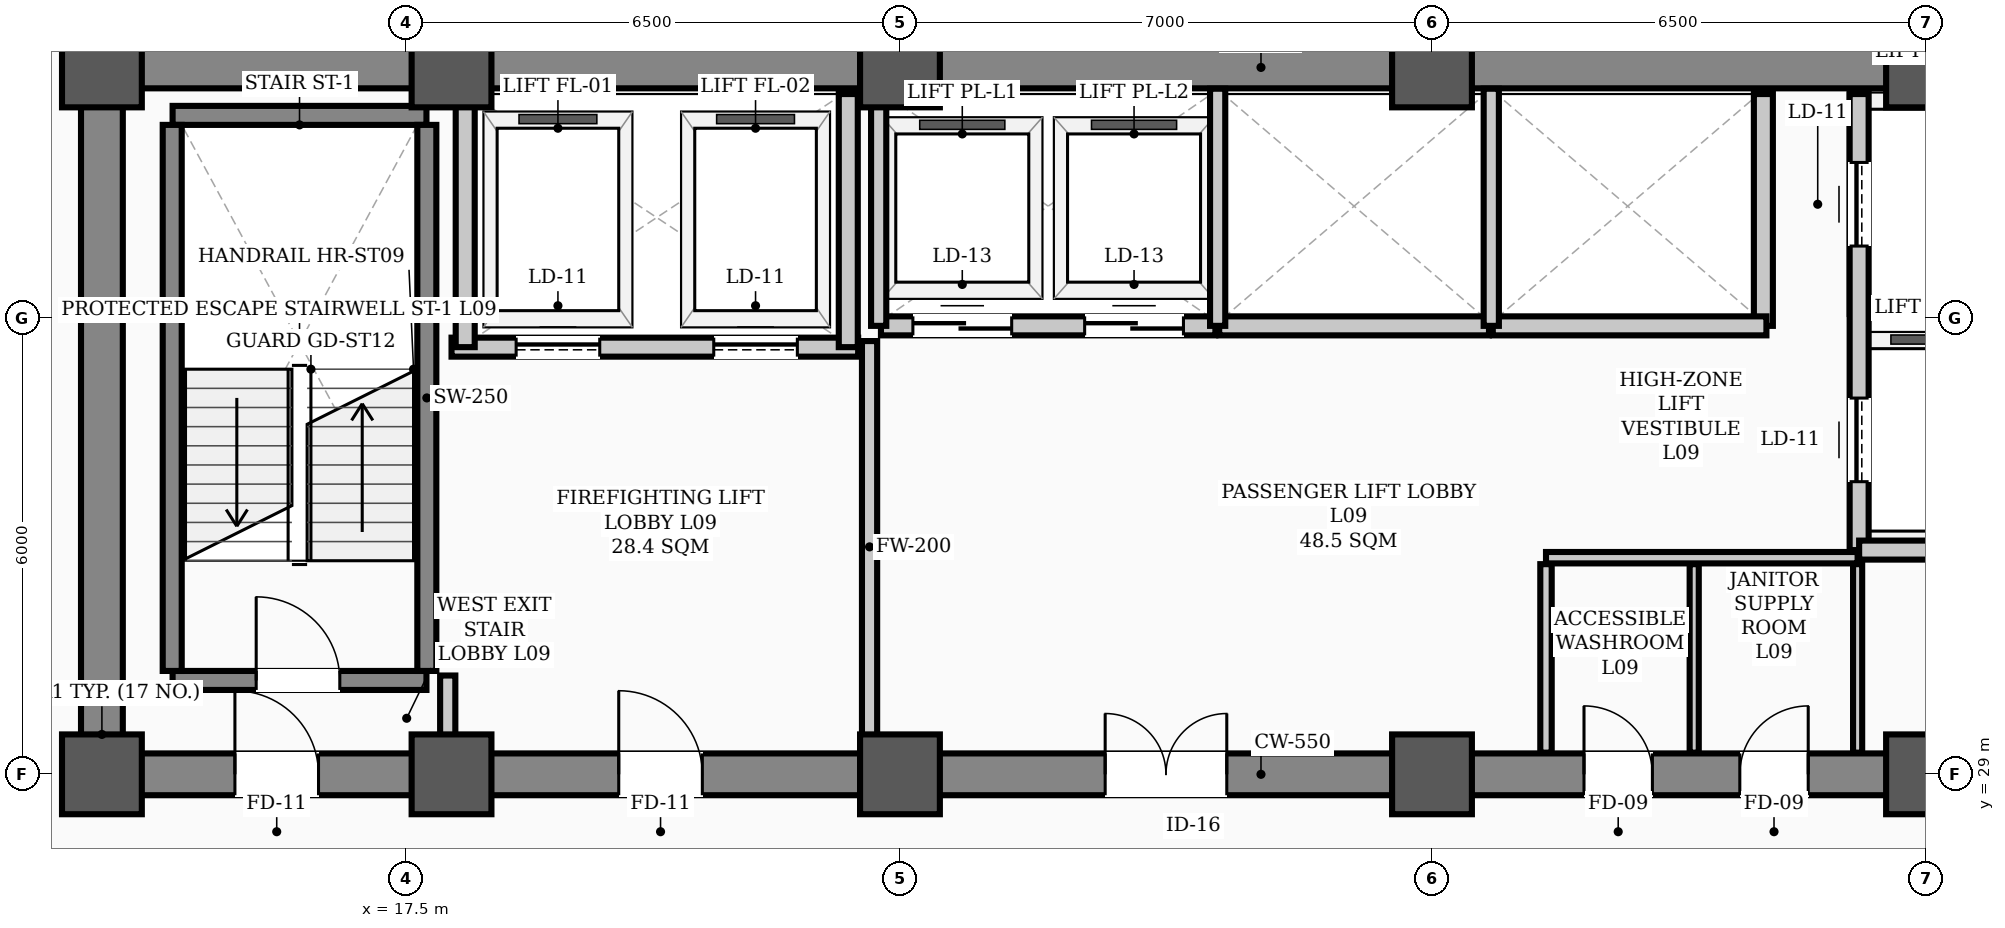
"""IFC4 building model, lengths in metres.
Left out: names, types, materials, properties, quantities, classifications, styles, units other than length and angle.
Written with IfcOpenShell. Run it as: python <this file> out.ifc"""

import sys

from ifc_helpers import new_model, si_unit, direction, frame, frame_2d, origin, origin_2d, place, context, subcontext, project, spatial, rectangle, hollow_rectangle, extrude, element, fill, save


model = new_model("IFC4")
c1 = context("Model", 3, precision=1e-05, world=origin(), true_north=direction((0.0, 1.0)))
c2 = subcontext(c1, "Body", "Model", "MODEL_VIEW")
j1 = project(units=[si_unit("LENGTHUNIT", "METRE"), si_unit("PLANEANGLEUNIT", "RADIAN")], contexts=[c1])
p1 = place(None, origin())
s1 = spatial("IfcSite", under=j1, at=p1, CompositionType="ELEMENT")
p2 = place(p1, origin())
s2 = spatial("IfcBuilding", under=s1, at=p2, CompositionType="ELEMENT")
p3 = place(p2, frame((0.0, 0.0, 38.2)))
s3 = spatial("IfcBuildingStorey", under=s2, at=p3, CompositionType="ELEMENT", Elevation=38.2)
for number, where, z_axis, x_axis in (
    (1, (13.5, 29.0, 0.0), (0.0, 0.0, 1.0), (1.0, 0.0, 0.0)),
    (2, (13.5, 38.3, 0.0), (0.0, 0.0, 1.0), (1.0, 0.0, 0.0)),
    (3, (18.1, 29.0, 0.0), (0.0, 0.0, 1.0), (1.0, 0.0, 0.0)),
    (4, (18.1, 38.3, 0.0), (0.0, 0.0, 1.0), (1.0, 0.0, 0.0)),
    (5, (24.0, 29.0, 0.0), (0.0, 0.0, 1.0), (1.0, 0.0, 0.0)),
    (6, (24.0, 38.3, 0.0), (0.0, 0.0, 1.0), (1.0, 0.0, 0.0)),
    (7, (31.0, 29.0, 0.0), (0.0, 0.0, 1.0), (1.0, 0.0, 0.0)),
    (8, (31.0, 38.3, 0.0), (0.0, 0.0, 1.0), (1.0, 0.0, 0.0)),
    (9, (37.5, 29.0, 0.0), (0.0, 0.0, 1.0), (1.0, 0.0, 0.0)),
    (10, (37.5, 38.3, 0.0), (0.0, 0.0, 1.0), (1.0, 0.0, 0.0)),
):
    element("IfcColumn", number, at=place(p3, frame(where, z_axis=z_axis, x_axis=x_axis)), inside=s3, PredefinedType="COLUMN", context=c2, shape_type="SweptSolid", body=[
        extrude(hollow_rectangle(XDim=1.05, YDim=1.05, WallThickness=0.038, InnerFilletRadius=0.019, OuterFilletRadius=0.057, at=origin_2d()), origin(), (0.0, 0.0, 1.0), 3.9),
    ])
p4 = place(p3, frame((13.5, 29.0, 0.0), z_axis=(0.0, 0.0, 1.0), x_axis=(1.0, 0.0, 0.0)))
e11 = element("IfcWall", 11, at=p4, inside=s3, PredefinedType="SHEAR", context=c2, shape_type="SweptSolid", body=[
    extrude(rectangle(XDim=30.5, YDim=0.55, at=frame_2d((15.25, 0.0))), origin(), (0.0, 0.0, 1.0), 3.72),
])
p5 = place(p4, frame((1.75, 0.0, 0.0)))
e12 = element("IfcOpeningElement", 12, at=p5, cuts=e11, PredefinedType="OPENING", context=c2, shape_type="SweptSolid", body=[
    extrude(rectangle(XDim=1.1, YDim=2.08, at=frame_2d((0.55, 1.04))), frame((0.0, 0.285, 0.0), z_axis=(0.0, -1.0, 0.0), x_axis=(1.0, 0.0, 0.0)), (0.0, 0.0, 1.0), 0.57),
])
p6 = place(p4, frame((26.7, 0.0, 0.0)))
e13 = element("IfcOpeningElement", 13, at=p6, cuts=e11, PredefinedType="OPENING", context=c2, shape_type="SweptSolid", body=[
    extrude(rectangle(XDim=1.1, YDim=2.08, at=frame_2d((0.55, 1.04))), frame((0.0, 0.285, 0.0), z_axis=(0.0, -1.0, 0.0), x_axis=(1.0, 0.0, 0.0)), (0.0, 0.0, 1.0), 0.57),
])
p7 = place(p4, frame((6.8, 0.0, 0.0)))
e14 = element("IfcOpeningElement", 14, at=p7, cuts=e11, PredefinedType="OPENING", context=c2, shape_type="SweptSolid", body=[
    extrude(rectangle(XDim=1.1, YDim=2.08, at=frame_2d((0.55, 1.04))), frame((0.0, 0.285, 0.0), z_axis=(0.0, -1.0, 0.0), x_axis=(1.0, 0.0, 0.0)), (0.0, 0.0, 1.0), 0.57),
])
p8 = place(p4, frame((13.2, 0.0, 0.0)))
e15 = element("IfcOpeningElement", 15, at=p8, cuts=e11, PredefinedType="OPENING", context=c2, shape_type="SweptSolid", body=[
    extrude(rectangle(XDim=1.6, YDim=2.08, at=frame_2d((0.8, 1.04))), frame((0.0, 0.285, 0.0), z_axis=(0.0, -1.0, 0.0), x_axis=(1.0, 0.0, 0.0)), (0.0, 0.0, 1.0), 0.57),
])
p9 = place(p4, frame((19.5, 0.0, 0.0)))
e16 = element("IfcOpeningElement", 16, at=p9, cuts=e11, PredefinedType="OPENING", context=c2, shape_type="SweptSolid", body=[
    extrude(rectangle(XDim=0.9, YDim=2.08, at=frame_2d((0.45, 1.04))), frame((0.0, 0.285, 0.0), z_axis=(0.0, -1.0, 0.0), x_axis=(1.0, 0.0, 0.0)), (0.0, 0.0, 1.0), 0.57),
])
p10 = place(p4, frame((21.55, 0.0, 0.0)))
e17 = element("IfcOpeningElement", 17, at=p10, cuts=e11, PredefinedType="OPENING", context=c2, shape_type="SweptSolid", body=[
    extrude(rectangle(XDim=0.9, YDim=2.08, at=frame_2d((0.45, 1.04))), frame((0.0, 0.285, 0.0), z_axis=(0.0, -1.0, 0.0), x_axis=(1.0, 0.0, 0.0)), (0.0, 0.0, 1.0), 0.57),
])
p11 = place(p3, frame((13.5, 38.3, 0.0), z_axis=(0.0, 0.0, 1.0), x_axis=(1.0, 0.0, 0.0)))
e18 = element("IfcWall", 18, at=p11, inside=s3, PredefinedType="SHEAR", context=c2, shape_type="SweptSolid", body=[
    extrude(rectangle(XDim=30.5, YDim=0.55, at=frame_2d((15.25, 0.0))), origin(), (0.0, 0.0, 1.0), 3.72),
])
p12 = place(p3, frame((13.5, 29.35, 0.0), z_axis=(0.0, 0.0, 1.0), x_axis=(0.0, 1.0, 0.0)))
e19 = element("IfcWall", 19, at=p12, inside=s3, PredefinedType="SHEAR", context=c2, shape_type="SweptSolid", body=[
    extrude(rectangle(XDim=8.6, YDim=0.55, at=frame_2d((4.3, 0.0))), origin(), (0.0, 0.0, 1.0), 3.72),
])
p13 = place(p3, frame((14.43, 30.235, 0.0), z_axis=(0.0, 0.0, 1.0), x_axis=(1.0, 0.0, 0.0)))
e20 = element("IfcWall", 20, at=p13, inside=s3, PredefinedType="STANDARD", context=c2, shape_type="SweptSolid", body=[
    extrude(rectangle(XDim=3.34, YDim=0.25, at=frame_2d((1.67, 0.0))), origin(), (0.0, 0.0, 1.0), 3.72),
])
p14 = place(p13, frame((1.1, 0.0, 0.0)))
e21 = element("IfcOpeningElement", 21, at=p14, cuts=e20, PredefinedType="OPENING", context=c2, shape_type="SweptSolid", body=[
    extrude(rectangle(XDim=1.1, YDim=2.08, at=frame_2d((0.55, 1.04))), frame((0.0, 0.135, 0.0), z_axis=(0.0, -1.0, 0.0), x_axis=(1.0, 0.0, 0.0)), (0.0, 0.0, 1.0), 0.27),
])
p15 = place(p3, frame((14.43, 37.669, 0.0), z_axis=(0.0, 0.0, 1.0), x_axis=(1.0, 0.0, 0.0)))
e22 = element("IfcWall", 22, at=p15, inside=s3, PredefinedType="STANDARD", context=c2, shape_type="SweptSolid", body=[
    extrude(rectangle(XDim=3.34, YDim=0.25, at=frame_2d((1.67, 0.0))), origin(), (0.0, 0.0, 1.0), 3.72),
])
for number, where, z_axis, x_axis in (
    (23, (14.425, 30.36, 0.0), (0.0, 0.0, 1.0), (0.0, 1.0, 0.0)),
    (24, (17.775, 30.36, 0.0), (0.0, 0.0, 1.0), (0.0, 1.0, 0.0)),
):
    element("IfcWall", number, at=place(p3, frame(where, z_axis=z_axis, x_axis=x_axis)), inside=s3, PredefinedType="STANDARD", context=c2, shape_type="SweptSolid", body=[
        extrude(rectangle(XDim=7.184, YDim=0.25, at=frame_2d((3.592, 0.0))), origin(), (0.0, 0.0, 1.0), 3.72),
    ])
p16 = place(p3, frame((18.1, 34.62, 0.0), z_axis=(0.0, 0.0, 1.0), x_axis=(1.0, 0.0, 0.0)))
e25 = element("IfcWall", 25, at=p16, inside=s3, PredefinedType="STANDARD", context=c2, shape_type="SweptSolid", body=[
    extrude(rectangle(XDim=5.35, YDim=0.25, at=frame_2d((2.675, 0.0))), origin(), (0.0, 0.0, 1.0), 3.72),
])
p17 = place(p16, frame((0.85, 0.0, 0.0)))
e26 = element("IfcOpeningElement", 26, at=p17, cuts=e25, PredefinedType="OPENING", context=c2, shape_type="SweptSolid", body=[
    extrude(rectangle(XDim=1.1, YDim=2.08, at=frame_2d((0.55, 1.04))), frame((0.0, 0.135, 0.0), z_axis=(0.0, -1.0, 0.0), x_axis=(1.0, 0.0, 0.0)), (0.0, 0.0, 1.0), 0.27),
])
p18 = place(p16, frame((3.45, 0.0, 0.0)))
e27 = element("IfcOpeningElement", 27, at=p18, cuts=e25, PredefinedType="OPENING", context=c2, shape_type="SweptSolid", body=[
    extrude(rectangle(XDim=1.1, YDim=2.08, at=frame_2d((0.55, 1.04))), frame((0.0, 0.135, 0.0), z_axis=(0.0, -1.0, 0.0), x_axis=(1.0, 0.0, 0.0)), (0.0, 0.0, 1.0), 0.27),
])
p19 = place(p3, frame((36.62, 31.95, 0.0), z_axis=(0.0, 0.0, 1.0), x_axis=(0.0, 1.0, 0.0)))
e28 = element("IfcWall", 28, at=p19, inside=s3, PredefinedType="STANDARD", context=c2, shape_type="SweptSolid", body=[
    extrude(rectangle(XDim=6.0, YDim=0.25, at=frame_2d((3.0, 0.0))), origin(), (0.0, 0.0, 1.0), 3.3),
])
p20 = place(p19, frame((0.9, 0.0, 0.0)))
e29 = element("IfcOpeningElement", 29, at=p20, cuts=e28, PredefinedType="OPENING", context=c2, shape_type="SweptSolid", body=[
    extrude(rectangle(XDim=1.1, YDim=2.08, at=frame_2d((0.55, 1.04))), frame((0.0, 0.135, 0.0), z_axis=(0.0, -1.0, 0.0), x_axis=(1.0, 0.0, 0.0)), (0.0, 0.0, 1.0), 0.27),
])
p21 = place(p19, frame((4.0, 0.0, 0.0)))
e30 = element("IfcOpeningElement", 30, at=p21, cuts=e28, PredefinedType="OPENING", context=c2, shape_type="SweptSolid", body=[
    extrude(rectangle(XDim=1.1, YDim=2.08, at=frame_2d((0.55, 1.04))), frame((0.0, 0.135, 0.0), z_axis=(0.0, -1.0, 0.0), x_axis=(1.0, 0.0, 0.0)), (0.0, 0.0, 1.0), 0.27),
])
p22 = place(p3, frame((36.62, 31.95, 0.0), z_axis=(0.0, 0.0, 1.0), x_axis=(1.0, 0.0, 0.0)))
e31 = element("IfcWall", 31, at=p22, inside=s3, PredefinedType="STANDARD", context=c2, shape_type="SweptSolid", body=[
    extrude(rectangle(XDim=1.9, YDim=0.25, at=frame_2d((0.95, 0.0))), origin(), (0.0, 0.0, 1.0), 3.48),
])
for number, where, z_axis, x_axis in (
    (32, (18.28, 34.62, 0.0), (0.0, 0.0, 1.0), (0.0, 1.0, 0.0)),
    (33, (23.32, 34.62, 0.0), (0.0, 0.0, 1.0), (0.0, 1.0, 0.0)),
):
    element("IfcWall", number, at=place(p3, frame(where, z_axis=z_axis, x_axis=x_axis)), inside=s3, PredefinedType="STANDARD", context=c2, shape_type="SweptSolid", body=[
        extrude(rectangle(XDim=3.33, YDim=0.25, at=frame_2d((1.665, 0.0))), origin(), (0.0, 0.0, 1.0), 3.3),
    ])
p23 = place(p3, frame((35.36, 34.9, 0.0), z_axis=(0.0, 0.0, 1.0), x_axis=(0.0, 1.0, 0.0)))
e34 = element("IfcWall", 34, at=p23, inside=s3, PredefinedType="STANDARD", context=c2, shape_type="SweptSolid", body=[
    extrude(rectangle(XDim=3.05, YDim=0.25, at=frame_2d((1.525, 0.0))), origin(), (0.0, 0.0, 1.0), 3.3),
])
p24 = place(p3, frame((23.75, 34.9, 0.0), z_axis=(0.0, 0.0, 1.0), x_axis=(1.0, 0.0, 0.0)))
e35 = element("IfcWall", 35, at=p24, inside=s3, PredefinedType="STANDARD", context=c2, shape_type="SweptSolid", body=[
    extrude(rectangle(XDim=4.4, YDim=0.25, at=frame_2d((2.2, 0.0))), origin(), (0.0, 0.0, 1.0), 3.72),
])
p25 = place(p24, frame((0.42, 0.0, 0.0)))
e36 = element("IfcOpeningElement", 36, at=p25, cuts=e35, PredefinedType="OPENING", context=c2, shape_type="SweptSolid", body=[
    extrude(rectangle(XDim=1.3, YDim=2.08, at=frame_2d((0.65, 1.04))), frame((0.0, 0.135, 0.0), z_axis=(0.0, -1.0, 0.0), x_axis=(1.0, 0.0, 0.0)), (0.0, 0.0, 1.0), 0.27),
])
p26 = place(p24, frame((2.68, 0.0, 0.0)))
e37 = element("IfcOpeningElement", 37, at=p26, cuts=e35, PredefinedType="OPENING", context=c2, shape_type="SweptSolid", body=[
    extrude(rectangle(XDim=1.3, YDim=2.08, at=frame_2d((0.65, 1.04))), frame((0.0, 0.135, 0.0), z_axis=(0.0, -1.0, 0.0), x_axis=(1.0, 0.0, 0.0)), (0.0, 0.0, 1.0), 0.27),
])
p27 = place(p3, frame((28.2, 34.9, 0.0), z_axis=(0.0, 0.0, 1.0), x_axis=(1.0, 0.0, 0.0)))
e38 = element("IfcWall", 38, at=p27, inside=s3, PredefinedType="STANDARD", context=c2, shape_type="SweptSolid", body=[
    extrude(rectangle(XDim=3.55, YDim=0.25, at=frame_2d((1.775, 0.0))), origin(), (0.0, 0.0, 1.0), 3.72),
])
p28 = place(p3, frame((31.8, 34.9, 0.0), z_axis=(0.0, 0.0, 1.0), x_axis=(1.0, 0.0, 0.0)))
e39 = element("IfcWall", 39, at=p28, inside=s3, PredefinedType="STANDARD", context=c2, shape_type="SweptSolid", body=[
    extrude(rectangle(XDim=3.6, YDim=0.25, at=frame_2d((1.8, 0.0))), origin(), (0.0, 0.0, 1.0), 3.72),
])
p29 = place(p3, frame((32.5, 31.85, 0.0), z_axis=(0.0, 0.0, 1.0), x_axis=(1.0, 0.0, 0.0)))
e40 = element("IfcWall", 40, at=p29, inside=s3, PredefinedType="PARTITIONING", context=c2, shape_type="SweptSolid", body=[
    extrude(rectangle(XDim=4.1, YDim=0.15, at=frame_2d((2.05, 0.0))), origin(), (0.0, 0.0, 1.0), 3.72),
])
p30 = place(p3, frame((18.05, 29.285, 0.0), z_axis=(0.0, 0.0, 1.0), x_axis=(0.0, 1.0, 0.0)))
e41 = element("IfcWall", 41, at=p30, inside=s3, PredefinedType="STANDARD", context=c2, shape_type="SweptSolid", body=[
    extrude(rectangle(XDim=1.015, YDim=0.2, at=frame_2d((0.508, 0.0))), origin(), (0.0, 0.0, 1.0), 3.3),
])
p31 = place(p3, frame((23.6, 29.285, 0.0), z_axis=(0.0, 0.0, 1.0), x_axis=(0.0, 1.0, 0.0)))
e42 = element("IfcWall", 42, at=p31, inside=s3, PredefinedType="STANDARD", context=c2, shape_type="SweptSolid", body=[
    extrude(rectangle(XDim=5.415, YDim=0.2, at=frame_2d((2.708, 0.0))), origin(), (0.0, 0.0, 1.0), 3.1),
])
p32 = place(p3, frame((32.5, 29.285, 0.0), z_axis=(0.0, 0.0, 1.0), x_axis=(0.0, 1.0, 0.0)))
e43 = element("IfcWall", 43, at=p32, inside=s3, PredefinedType="PARTITIONING", context=c2, shape_type="SweptSolid", body=[
    extrude(rectangle(XDim=2.48, YDim=0.15, at=frame_2d((1.24, 0.0))), origin(), (0.0, 0.0, 1.0), 3.3),
])
for number, where, z_axis, x_axis in (
    (44, (36.6, 29.285, 0.0), (0.0, 0.0, 1.0), (0.0, 1.0, 0.0)),
    (45, (34.45, 29.285, 0.0), (0.0, 0.0, 1.0), (0.0, 1.0, 0.0)),
):
    element("IfcWall", number, at=place(p3, frame(where, z_axis=z_axis, x_axis=x_axis)), inside=s3, PredefinedType="PARTITIONING", context=c2, shape_type="SweptSolid", body=[
        extrude(rectangle(XDim=2.48, YDim=0.12, at=frame_2d((1.24, 0.0))), origin(), (0.0, 0.0, 1.0), 3.3),
    ])
p33 = place(p3, frame((23.72, 34.9, 0.0), z_axis=(0.0, 0.0, 1.0), x_axis=(0.0, 1.0, 0.0)))
e46 = element("IfcWall", 46, at=p33, inside=s3, PredefinedType="STANDARD", context=c2, shape_type="SweptSolid", body=[
    extrude(rectangle(XDim=3.12, YDim=0.2, at=frame_2d((1.56, 0.0))), origin(), (0.0, 0.0, 1.0), 3.1),
])
for number, where, z_axis, x_axis in (
    (47, (28.18, 34.9, 0.0), (0.0, 0.0, 1.0), (0.0, 1.0, 0.0)),
    (48, (31.78, 34.9, 0.0), (0.0, 0.0, 1.0), (0.0, 1.0, 0.0)),
):
    element("IfcWall", number, at=place(p3, frame(where, z_axis=z_axis, x_axis=x_axis)), inside=s3, PredefinedType="STANDARD", context=c2, shape_type="SweptSolid", body=[
        extrude(rectangle(XDim=3.12, YDim=0.2, at=frame_2d((1.56, 0.0))), origin(), (0.0, 0.0, 1.0), 3.3),
    ])
p34 = place(p14, origin())
e49 = element("IfcDoor", 49, at=p34, inside=s3, OperationType="SINGLE_SWING_LEFT", PredefinedType="DOOR", context=c2, shape_type="SweptSolid", body=[
    extrude(rectangle(XDim=1.1, YDim=2.08, at=frame_2d((0.55, 1.04))), frame((0.0, 0.025, 0.0), z_axis=(0.0, -1.0, 0.0), x_axis=(1.0, 0.0, 0.0)), (0.0, 0.0, 1.0), 0.05),
])
fill(e21, e49)
p35 = place(p5, origin())
e50 = element("IfcDoor", 50, at=p35, inside=s3, OperationType="SINGLE_SWING_LEFT", PredefinedType="DOOR", context=c2, shape_type="SweptSolid", body=[
    extrude(rectangle(XDim=1.1, YDim=2.08, at=frame_2d((0.55, 1.04))), frame((0.0, 0.025, 0.0), z_axis=(0.0, -1.0, 0.0), x_axis=(1.0, 0.0, 0.0)), (0.0, 0.0, 1.0), 0.05),
])
fill(e12, e50)
p36 = place(p7, origin())
e51 = element("IfcDoor", 51, at=p36, inside=s3, OperationType="SINGLE_SWING_LEFT", PredefinedType="DOOR", context=c2, shape_type="SweptSolid", body=[
    extrude(rectangle(XDim=1.1, YDim=2.08, at=frame_2d((0.55, 1.04))), frame((0.0, 0.025, 0.0), z_axis=(0.0, -1.0, 0.0), x_axis=(1.0, 0.0, 0.0)), (0.0, 0.0, 1.0), 0.05),
])
fill(e14, e51)
p37 = place(p8, origin())
e52 = element("IfcDoor", 52, at=p37, inside=s3, OperationType="DOUBLE_DOOR_SINGLE_SWING", PredefinedType="DOOR", context=c2, shape_type="SweptSolid", body=[
    extrude(rectangle(XDim=1.6, YDim=2.08, at=frame_2d((0.8, 1.04))), frame((0.0, 0.025, 0.0), z_axis=(0.0, -1.0, 0.0), x_axis=(1.0, 0.0, 0.0)), (0.0, 0.0, 1.0), 0.05),
])
fill(e15, e52)
p38 = place(p9, origin())
e53 = element("IfcDoor", 53, at=p38, inside=s3, OperationType="SINGLE_SWING_LEFT", PredefinedType="DOOR", context=c2, shape_type="SweptSolid", body=[
    extrude(rectangle(XDim=0.9, YDim=2.08, at=frame_2d((0.45, 1.04))), frame((0.0, 0.025, 0.0), z_axis=(0.0, -1.0, 0.0), x_axis=(1.0, 0.0, 0.0)), (0.0, 0.0, 1.0), 0.05),
])
fill(e16, e53)
p39 = place(p10, origin())
e54 = element("IfcDoor", 54, at=p39, inside=s3, OperationType="SINGLE_SWING_RIGHT", PredefinedType="DOOR", context=c2, shape_type="SweptSolid", body=[
    extrude(rectangle(XDim=0.9, YDim=2.08, at=frame_2d((0.45, 1.04))), frame((0.0, 0.025, 0.0), z_axis=(0.0, -1.0, 0.0), x_axis=(1.0, 0.0, 0.0)), (0.0, 0.0, 1.0), 0.05),
])
fill(e17, e54)
p40 = place(p17, origin())
e55 = element("IfcDoor", 55, at=p40, inside=s3, OperationType="SLIDING_TO_LEFT", PredefinedType="DOOR", context=c2, shape_type="SweptSolid", body=[
    extrude(rectangle(XDim=1.1, YDim=2.08, at=frame_2d((0.55, 1.04))), frame((0.0, 0.025, 0.0), z_axis=(0.0, -1.0, 0.0), x_axis=(1.0, 0.0, 0.0)), (0.0, 0.0, 1.0), 0.05),
])
fill(e26, e55)
p41 = place(p18, origin())
e56 = element("IfcDoor", 56, at=p41, inside=s3, OperationType="SLIDING_TO_LEFT", PredefinedType="DOOR", context=c2, shape_type="SweptSolid", body=[
    extrude(rectangle(XDim=1.1, YDim=2.08, at=frame_2d((0.55, 1.04))), frame((0.0, 0.025, 0.0), z_axis=(0.0, -1.0, 0.0), x_axis=(1.0, 0.0, 0.0)), (0.0, 0.0, 1.0), 0.05),
])
fill(e27, e56)
p42 = place(p20, origin())
e57 = element("IfcDoor", 57, at=p42, inside=s3, OperationType="SLIDING_TO_LEFT", PredefinedType="DOOR", context=c2, shape_type="SweptSolid", body=[
    extrude(rectangle(XDim=1.1, YDim=2.08, at=frame_2d((0.55, 1.04))), frame((0.0, 0.025, 0.0), z_axis=(0.0, -1.0, 0.0), x_axis=(1.0, 0.0, 0.0)), (0.0, 0.0, 1.0), 0.05),
])
fill(e29, e57)
p43 = place(p21, origin())
e58 = element("IfcDoor", 58, at=p43, inside=s3, OperationType="SLIDING_TO_LEFT", PredefinedType="DOOR", context=c2, shape_type="SweptSolid", body=[
    extrude(rectangle(XDim=1.1, YDim=2.08, at=frame_2d((0.55, 1.04))), frame((0.0, 0.025, 0.0), z_axis=(0.0, -1.0, 0.0), x_axis=(1.0, 0.0, 0.0)), (0.0, 0.0, 1.0), 0.05),
])
fill(e30, e58)
p44 = place(p25, origin())
e59 = element("IfcDoor", 59, at=p44, inside=s3, OperationType="DOUBLE_DOOR_SLIDING", PredefinedType="DOOR", context=c2, shape_type="SweptSolid", body=[
    extrude(rectangle(XDim=1.3, YDim=2.08, at=frame_2d((0.65, 1.04))), frame((0.0, 0.025, 0.0), z_axis=(0.0, -1.0, 0.0), x_axis=(1.0, 0.0, 0.0)), (0.0, 0.0, 1.0), 0.05),
])
fill(e36, e59)
p45 = place(p26, origin())
e60 = element("IfcDoor", 60, at=p45, inside=s3, OperationType="DOUBLE_DOOR_SLIDING", PredefinedType="DOOR", context=c2, shape_type="SweptSolid", body=[
    extrude(rectangle(XDim=1.3, YDim=2.08, at=frame_2d((0.65, 1.04))), frame((0.0, 0.025, 0.0), z_axis=(0.0, -1.0, 0.0), x_axis=(1.0, 0.0, 0.0)), (0.0, 0.0, 1.0), 0.05),
])
fill(e37, e60)
save(model, sys.argv[1])
